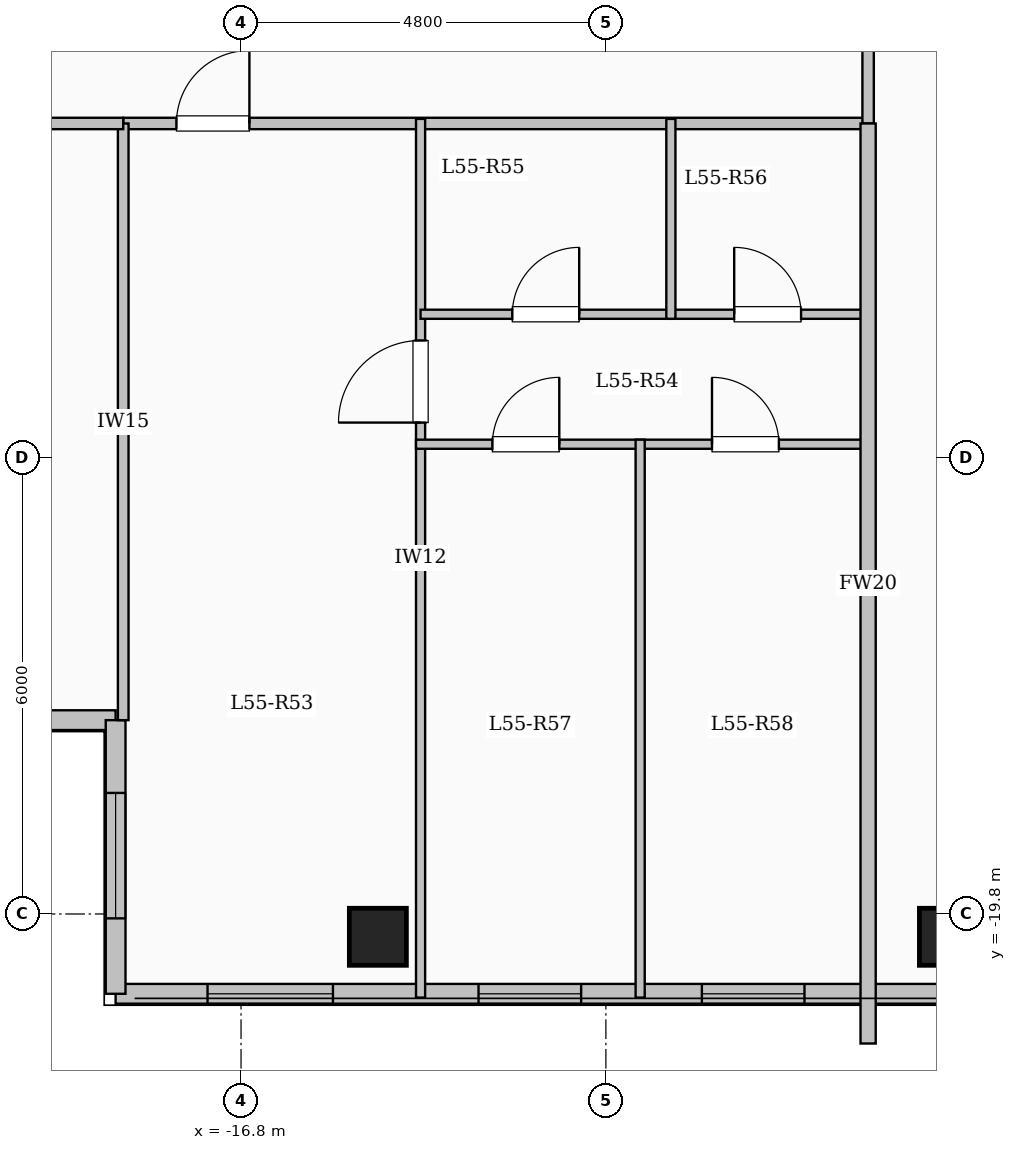
"""IFC4 building model, lengths in metres.
Left out: names, types, materials, properties, quantities, classifications, styles, units other than length and angle.
Written with IfcOpenShell. Run it as: python <this file> out.ifc"""

import sys

from ifc_helpers import new_model, si_unit, direction, frame, frame_2d, origin, origin_2d, place, context, subcontext, project, spatial, rectangle, extrude, element, fill, save


model = new_model("IFC4")
c1 = context("Model", 3, precision=1e-05, world=origin(), true_north=direction((0.0, 1.0)))
c2 = subcontext(c1, "Body", "Model", "MODEL_VIEW")
j1 = project(units=[si_unit("LENGTHUNIT", "METRE"), si_unit("PLANEANGLEUNIT", "RADIAN")], contexts=[c1])
p1 = place(None, origin())
s1 = spatial("IfcSite", under=j1, at=p1, CompositionType="ELEMENT")
p2 = place(p1, origin())
s2 = spatial("IfcBuilding", under=s1, at=p2, CompositionType="ELEMENT")
p3 = place(p2, frame((0.0, 0.0, 203.65)))
s3 = spatial("IfcBuildingStorey", under=s2, at=p3, CompositionType="ELEMENT", Elevation=203.65)
for number, where, z_axis, x_axis in (
    (1, (-15.0, -20.1, 0.0), (0.0, 0.0, 1.0), (1.0, 0.0, 0.0)),
    (2, (-7.5, -20.1, 0.0), (0.0, 0.0, 1.0), (1.0, 0.0, 0.0)),
):
    element("IfcColumn", number, at=place(p3, frame(where, z_axis=z_axis, x_axis=x_axis)), inside=s3, PredefinedType="COLUMN", context=c2, shape_type="SweptSolid", body=[
        extrude(rectangle(XDim=0.75, YDim=0.75, at=origin_2d()), origin(), (0.0, 0.0, 1.0), 3.35),
    ])
p4 = place(p3, frame((-18.45, -17.25, 0.0), z_axis=(0.0, 0.0, 1.0), x_axis=(-1.0, 0.0, 0.0)))
e3 = element("IfcWall", 3, at=p4, inside=s3, PredefinedType="SOLIDWALL", context=c2, shape_type="SweptSolid", body=[
    extrude(rectangle(XDim=5.1, YDim=0.26, at=frame_2d((2.55, 0.0))), origin(), (0.0, 0.0, 1.0), 3.1),
])
p5 = place(p4, frame((1.425, 0.0, 0.9)))
e4 = element("IfcOpeningElement", 4, at=p5, cuts=e3, PredefinedType="OPENING", context=c2, shape_type="SweptSolid", body=[
    extrude(rectangle(XDim=2.2, YDim=1.75, at=frame_2d((1.1, 0.875))), frame((0.0, 0.14, 0.0), z_axis=(0.0, -1.0, 0.0), x_axis=(1.0, 0.0, 0.0)), (0.0, 0.0, 1.0), 0.28),
])
p6 = place(p3, frame((-7.35, -20.85, 0.0), z_axis=(0.0, 0.0, 1.0), x_axis=(-1.0, 0.0, 0.0)))
e5 = element("IfcWall", 5, at=p6, inside=s3, PredefinedType="SOLIDWALL", context=c2, shape_type="SweptSolid", body=[
    extrude(rectangle(XDim=11.1, YDim=0.26, at=frame_2d((5.55, 0.0))), origin(), (0.0, 0.0, 1.0), 3.1),
])
p7 = place(p6, frame((2.037, 0.0, 0.95)))
e6 = element("IfcOpeningElement", 6, at=p7, cuts=e5, PredefinedType="OPENING", context=c2, shape_type="SweptSolid", body=[
    extrude(rectangle(XDim=1.35, YDim=1.55, at=frame_2d((0.675, 0.775))), frame((0.0, 0.14, 0.0), z_axis=(0.0, -1.0, 0.0), x_axis=(1.0, 0.0, 0.0)), (0.0, 0.0, 1.0), 0.28),
])
p8 = place(p6, frame((4.976, 0.0, 0.95)))
e7 = element("IfcOpeningElement", 7, at=p8, cuts=e5, PredefinedType="OPENING", context=c2, shape_type="SweptSolid", body=[
    extrude(rectangle(XDim=1.35, YDim=1.55, at=frame_2d((0.675, 0.775))), frame((0.0, 0.14, 0.0), z_axis=(0.0, -1.0, 0.0), x_axis=(1.0, 0.0, 0.0)), (0.0, 0.0, 1.0), 0.28),
])
p9 = place(p6, frame((8.241, 0.0, 0.9)))
e8 = element("IfcOpeningElement", 8, at=p9, cuts=e5, PredefinedType="OPENING", context=c2, shape_type="SweptSolid", body=[
    extrude(rectangle(XDim=1.65, YDim=1.6, at=frame_2d((0.825, 0.8))), frame((0.0, 0.14, 0.0), z_axis=(0.0, -1.0, 0.0), x_axis=(1.0, 0.0, 0.0)), (0.0, 0.0, 1.0), 0.28),
])
p10 = place(p3, frame((-18.45, -20.85, 0.0), z_axis=(0.0, 0.0, 1.0), x_axis=(0.0, 1.0, 0.0)))
e9 = element("IfcWall", 9, at=p10, inside=s3, PredefinedType="SOLIDWALL", context=c2, shape_type="SweptSolid", body=[
    extrude(rectangle(XDim=3.6, YDim=0.26, at=frame_2d((1.8, 0.0))), origin(), (0.0, 0.0, 1.0), 3.1),
])
p11 = place(p10, frame((0.992, 0.0, 0.9)))
e10 = element("IfcOpeningElement", 10, at=p11, cuts=e9, PredefinedType="OPENING", context=c2, shape_type="SweptSolid", body=[
    extrude(rectangle(XDim=1.65, YDim=1.6, at=frame_2d((0.825, 0.8))), frame((0.0, 0.14, 0.0), z_axis=(0.0, -1.0, 0.0), x_axis=(1.0, 0.0, 0.0)), (0.0, 0.0, 1.0), 0.28),
])
p12 = place(p3, frame((-18.35, -9.4, 0.0), z_axis=(0.0, 0.0, 1.0), x_axis=(1.0, 0.0, 0.0)))
e11 = element("IfcWall", 11, at=p12, inside=s3, PredefinedType="PARTITIONING", context=c2, shape_type="SweptSolid", body=[
    extrude(rectangle(XDim=9.8, YDim=0.15, at=frame_2d((4.9, 0.0))), origin(), (0.0, 0.0, 1.0), 3.1),
])
p13 = place(p12, frame((0.7, 0.0, 0.0)))
e12 = element("IfcOpeningElement", 12, at=p13, cuts=e11, PredefinedType="OPENING", context=c2, shape_type="SweptSolid", body=[
    extrude(rectangle(XDim=0.96, YDim=2.15, at=frame_2d((0.48, 1.075))), frame((0.0, 0.085, 0.0), z_axis=(0.0, -1.0, 0.0), x_axis=(1.0, 0.0, 0.0)), (0.0, 0.0, 1.0), 0.17),
])
p14 = place(p3, frame((-8.55, -9.4, 0.0), z_axis=(0.0, 0.0, 1.0), x_axis=(0.0, 1.0, 0.0)))
e13 = element("IfcWall", 13, at=p14, inside=s3, PredefinedType="PARTITIONING", context=c2, shape_type="SweptSolid", body=[
    extrude(rectangle(XDim=2.15, YDim=0.15, at=frame_2d((1.075, 0.0))), origin(), (0.0, 0.0, 1.0), 3.1),
])
p15 = place(p3, frame((-14.438, -20.9, 0.0), z_axis=(0.0, 0.0, 1.0), x_axis=(0.0, 1.0, 0.0)))
e14 = element("IfcWall", 14, at=p15, inside=s3, PredefinedType="PARTITIONING", context=c2, shape_type="SweptSolid", body=[
    extrude(rectangle(XDim=11.56, YDim=0.12, at=frame_2d((5.78, 0.0))), origin(), (0.0, 0.0, 1.0), 3.1),
])
p16 = place(p15, frame((7.565, 0.0, 0.0)))
e15 = element("IfcOpeningElement", 15, at=p16, cuts=e14, PredefinedType="OPENING", context=c2, shape_type="SweptSolid", body=[
    extrude(rectangle(XDim=1.08, YDim=2.15, at=frame_2d((0.54, 1.075))), frame((0.0, 0.07, 0.0), z_axis=(0.0, -1.0, 0.0), x_axis=(1.0, 0.0, 0.0)), (0.0, 0.0, 1.0), 0.14),
])
p17 = place(p3, frame((-14.438, -11.91, 0.0), z_axis=(0.0, 0.0, 1.0), x_axis=(1.0, 0.0, 0.0)))
e16 = element("IfcWall", 16, at=p17, inside=s3, PredefinedType="PARTITIONING", context=c2, shape_type="SweptSolid", body=[
    extrude(rectangle(XDim=3.293, YDim=0.12, at=frame_2d((1.646, 0.0))), origin(), (0.0, 0.0, 1.0), 3.1),
])
p18 = place(p17, frame((1.207, 0.0, 0.0)))
e17 = element("IfcOpeningElement", 17, at=p18, cuts=e16, PredefinedType="OPENING", context=c2, shape_type="SweptSolid", body=[
    extrude(rectangle(XDim=0.88, YDim=2.1, at=frame_2d((0.44, 1.05))), frame((0.0, 0.07, 0.0), z_axis=(0.0, -1.0, 0.0), x_axis=(1.0, 0.0, 0.0)), (0.0, 0.0, 1.0), 0.14),
])
p19 = place(p3, frame((-11.145, -11.91, 0.0), z_axis=(0.0, 0.0, 1.0), x_axis=(1.0, 0.0, 0.0)))
e18 = element("IfcWall", 18, at=p19, inside=s3, PredefinedType="PARTITIONING", context=c2, shape_type="SweptSolid", body=[
    extrude(rectangle(XDim=2.545, YDim=0.12, at=frame_2d((1.272, 0.0))), origin(), (0.0, 0.0, 1.0), 3.1),
])
p20 = place(p19, frame((0.833, 0.0, 0.0)))
e19 = element("IfcOpeningElement", 19, at=p20, cuts=e18, PredefinedType="OPENING", context=c2, shape_type="SweptSolid", body=[
    extrude(rectangle(XDim=0.88, YDim=2.1, at=frame_2d((0.44, 1.05))), frame((0.0, 0.07, 0.0), z_axis=(0.0, -1.0, 0.0), x_axis=(1.0, 0.0, 0.0)), (0.0, 0.0, 1.0), 0.14),
])
p21 = place(p3, frame((-14.498, -13.62, 0.0), z_axis=(0.0, 0.0, 1.0), x_axis=(1.0, 0.0, 0.0)))
e20 = element("IfcWall", 20, at=p21, inside=s3, PredefinedType="PARTITIONING", context=c2, shape_type="SweptSolid", body=[
    extrude(rectangle(XDim=5.958, YDim=0.12, at=frame_2d((2.979, 0.0))), origin(), (0.0, 0.0, 1.0), 3.1),
])
p22 = place(p21, frame((1.005, 0.0, 0.0)))
e21 = element("IfcOpeningElement", 21, at=p22, cuts=e20, PredefinedType="OPENING", context=c2, shape_type="SweptSolid", body=[
    extrude(rectangle(XDim=0.88, YDim=2.1, at=frame_2d((0.44, 1.05))), frame((0.0, 0.07, 0.0), z_axis=(0.0, -1.0, 0.0), x_axis=(1.0, 0.0, 0.0)), (0.0, 0.0, 1.0), 0.14),
])
p23 = place(p21, frame((3.894, 0.0, 0.0)))
e22 = element("IfcOpeningElement", 22, at=p23, cuts=e20, PredefinedType="OPENING", context=c2, shape_type="SweptSolid", body=[
    extrude(rectangle(XDim=0.88, YDim=2.1, at=frame_2d((0.44, 1.05))), frame((0.0, 0.07, 0.0), z_axis=(0.0, -1.0, 0.0), x_axis=(1.0, 0.0, 0.0)), (0.0, 0.0, 1.0), 0.14),
])
p24 = place(p3, frame((-11.145, -11.97, 0.0), z_axis=(0.0, 0.0, 1.0), x_axis=(0.0, 1.0, 0.0)))
e23 = element("IfcWall", 23, at=p24, inside=s3, PredefinedType="PARTITIONING", context=c2, shape_type="SweptSolid", body=[
    extrude(rectangle(XDim=2.63, YDim=0.12, at=frame_2d((1.315, 0.0))), origin(), (0.0, 0.0, 1.0), 3.1),
])
p25 = place(p3, frame((-11.549, -20.9, 0.0), z_axis=(0.0, 0.0, 1.0), x_axis=(0.0, 1.0, 0.0)))
e24 = element("IfcWall", 24, at=p25, inside=s3, PredefinedType="PARTITIONING", context=c2, shape_type="SweptSolid", body=[
    extrude(rectangle(XDim=7.34, YDim=0.12, at=frame_2d((3.67, 0.0))), origin(), (0.0, 0.0, 1.0), 3.1),
])
p26 = place(p3, frame((-8.55, -21.504, 0.0), z_axis=(0.0, 0.0, 1.0), x_axis=(0.0, 1.0, 0.0)))
e25 = element("IfcWall", 25, at=p26, inside=s3, PredefinedType="SOLIDWALL", context=c2, shape_type="SweptSolid", body=[
    extrude(rectangle(XDim=12.104, YDim=0.2, at=frame_2d((6.052, 0.0))), origin(), (0.0, 0.0, 1.0), 3.1),
])
p27 = place(p3, frame((-18.35, -17.25, 0.0), z_axis=(0.0, 0.0, 1.0), x_axis=(0.0, 1.0, 0.0)))
e26 = element("IfcWall", 26, at=p27, inside=s3, PredefinedType="PARTITIONING", context=c2, shape_type="SweptSolid", body=[
    extrude(rectangle(XDim=7.85, YDim=0.14, at=frame_2d((3.925, 0.0))), origin(), (0.0, 0.0, 1.0), 3.1),
])
p28 = place(p3, frame((-23.58, -9.4, 0.0), z_axis=(0.0, 0.0, 1.0), x_axis=(1.0, 0.0, 0.0)))
e27 = element("IfcWall", 27, at=p28, inside=s3, PredefinedType="PARTITIONING", context=c2, shape_type="SweptSolid", body=[
    extrude(rectangle(XDim=5.23, YDim=0.15, at=frame_2d((2.615, 0.0))), origin(), (0.0, 0.0, 1.0), 3.1),
])
p29 = place(p28, frame((2.14, 0.0, 0.0)))
e28 = element("IfcOpeningElement", 28, at=p29, cuts=e27, PredefinedType="OPENING", context=c2, shape_type="SweptSolid", body=[
    extrude(rectangle(XDim=0.95, YDim=2.15, at=frame_2d((0.475, 1.075))), frame((0.0, 0.085, 0.0), z_axis=(0.0, -1.0, 0.0), x_axis=(1.0, 0.0, 0.0)), (0.0, 0.0, 1.0), 0.17),
])
p30 = place(p7, origin())
e29 = element("IfcWindow", 29, at=p30, inside=s3, PartitioningType="SINGLE_PANEL", PredefinedType="WINDOW", context=c2, shape_type="SweptSolid", body=[
    extrude(rectangle(XDim=1.35, YDim=1.55, at=frame_2d((0.675, 0.775))), frame((0.0, 0.03, 0.0), z_axis=(0.0, -1.0, 0.0), x_axis=(1.0, 0.0, 0.0)), (0.0, 0.0, 1.0), 0.06),
])
fill(e6, e29)
p31 = place(p8, origin())
e30 = element("IfcWindow", 30, at=p31, inside=s3, PartitioningType="SINGLE_PANEL", PredefinedType="WINDOW", context=c2, shape_type="SweptSolid", body=[
    extrude(rectangle(XDim=1.35, YDim=1.55, at=frame_2d((0.675, 0.775))), frame((0.0, 0.03, 0.0), z_axis=(0.0, -1.0, 0.0), x_axis=(1.0, 0.0, 0.0)), (0.0, 0.0, 1.0), 0.06),
])
fill(e7, e30)
p32 = place(p9, origin())
e31 = element("IfcWindow", 31, at=p32, inside=s3, PartitioningType="SINGLE_PANEL", PredefinedType="WINDOW", context=c2, shape_type="SweptSolid", body=[
    extrude(rectangle(XDim=1.65, YDim=1.6, at=frame_2d((0.825, 0.8))), frame((0.0, 0.03, 0.0), z_axis=(0.0, -1.0, 0.0), x_axis=(1.0, 0.0, 0.0)), (0.0, 0.0, 1.0), 0.06),
])
fill(e8, e31)
p33 = place(p11, origin())
e32 = element("IfcWindow", 32, at=p33, inside=s3, PartitioningType="SINGLE_PANEL", PredefinedType="WINDOW", context=c2, shape_type="SweptSolid", body=[
    extrude(rectangle(XDim=1.65, YDim=1.6, at=frame_2d((0.825, 0.8))), frame((0.0, 0.03, 0.0), z_axis=(0.0, -1.0, 0.0), x_axis=(1.0, 0.0, 0.0)), (0.0, 0.0, 1.0), 0.06),
])
fill(e10, e32)
p34 = place(p13, origin())
e33 = element("IfcDoor", 33, at=p34, inside=s3, OperationType="SINGLE_SWING_RIGHT", PredefinedType="DOOR", context=c2, shape_type="SweptSolid", body=[
    extrude(rectangle(XDim=0.96, YDim=2.15, at=frame_2d((0.48, 1.075))), frame((0.0, 0.025, 0.0), z_axis=(0.0, -1.0, 0.0), x_axis=(1.0, 0.0, 0.0)), (0.0, 0.0, 1.0), 0.05),
])
fill(e12, e33)
p35 = place(p16, origin())
e34 = element("IfcDoor", 34, at=p35, inside=s3, OperationType="SINGLE_SWING_LEFT", PredefinedType="DOOR", context=c2, shape_type="SweptSolid", body=[
    extrude(rectangle(XDim=1.08, YDim=2.15, at=frame_2d((0.54, 1.075))), frame((0.0, 0.025, 0.0), z_axis=(0.0, -1.0, 0.0), x_axis=(1.0, 0.0, 0.0)), (0.0, 0.0, 1.0), 0.05),
])
fill(e15, e34)
p36 = place(p18, origin())
e35 = element("IfcDoor", 35, at=p36, inside=s3, OperationType="SINGLE_SWING_RIGHT", PredefinedType="DOOR", context=c2, shape_type="SweptSolid", body=[
    extrude(rectangle(XDim=0.88, YDim=2.1, at=frame_2d((0.44, 1.05))), frame((0.0, 0.025, 0.0), z_axis=(0.0, -1.0, 0.0), x_axis=(1.0, 0.0, 0.0)), (0.0, 0.0, 1.0), 0.05),
])
fill(e17, e35)
p37 = place(p20, origin())
e36 = element("IfcDoor", 36, at=p37, inside=s3, OperationType="SINGLE_SWING_LEFT", PredefinedType="DOOR", context=c2, shape_type="SweptSolid", body=[
    extrude(rectangle(XDim=0.88, YDim=2.1, at=frame_2d((0.44, 1.05))), frame((0.0, 0.025, 0.0), z_axis=(0.0, -1.0, 0.0), x_axis=(1.0, 0.0, 0.0)), (0.0, 0.0, 1.0), 0.05),
])
fill(e19, e36)
p38 = place(p22, origin())
e37 = element("IfcDoor", 37, at=p38, inside=s3, OperationType="SINGLE_SWING_RIGHT", PredefinedType="DOOR", context=c2, shape_type="SweptSolid", body=[
    extrude(rectangle(XDim=0.88, YDim=2.1, at=frame_2d((0.44, 1.05))), frame((0.0, 0.025, 0.0), z_axis=(0.0, -1.0, 0.0), x_axis=(1.0, 0.0, 0.0)), (0.0, 0.0, 1.0), 0.05),
])
fill(e21, e37)
p39 = place(p23, origin())
e38 = element("IfcDoor", 38, at=p39, inside=s3, OperationType="SINGLE_SWING_LEFT", PredefinedType="DOOR", context=c2, shape_type="SweptSolid", body=[
    extrude(rectangle(XDim=0.88, YDim=2.1, at=frame_2d((0.44, 1.05))), frame((0.0, 0.025, 0.0), z_axis=(0.0, -1.0, 0.0), x_axis=(1.0, 0.0, 0.0)), (0.0, 0.0, 1.0), 0.05),
])
fill(e22, e38)
save(model, sys.argv[1])
